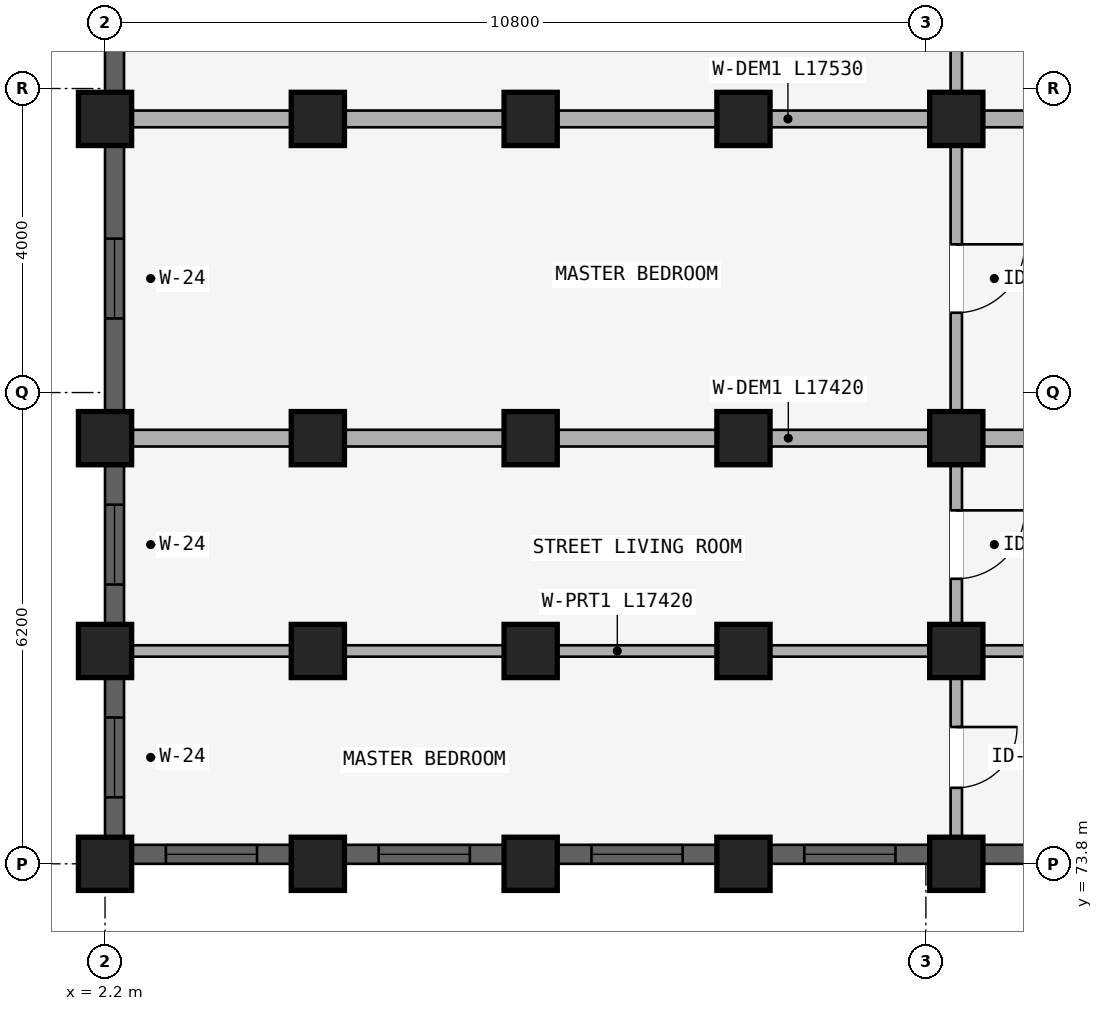
"""IFC4 building model, lengths in metres.
Left out: names, types, materials, properties, quantities, classifications, styles, units other than length and angle.
Written with IfcOpenShell. Run it as: python <this file> out.ifc"""

import sys

from ifc_helpers import new_model, si_unit, direction, frame, frame_2d, origin, origin_2d, place, context, subcontext, project, spatial, rectangle, extrude, element, fill, save


model = new_model("IFC4")
c1 = context("Model", 3, precision=1e-05, world=origin(), true_north=direction((0.0, 1.0)))
c2 = subcontext(c1, "Body", "Model", "MODEL_VIEW")
j1 = project(units=[si_unit("LENGTHUNIT", "METRE"), si_unit("PLANEANGLEUNIT", "RADIAN")], contexts=[c1])
p1 = place(None, origin())
s1 = spatial("IfcSite", under=j1, at=p1, CompositionType="ELEMENT")
p2 = place(p1, origin())
s2 = spatial("IfcBuilding", under=s1, at=p2, CompositionType="ELEMENT")
p3 = place(p2, frame((0.0, 0.0, 21.3)))
s3 = spatial("IfcBuildingStorey", under=s2, at=p3, CompositionType="ELEMENT", Elevation=21.3)
for number, where, z_axis, x_axis in (
    (1, (13.4, 83.6, 0.0), (0.0, 0.0, 1.0), (1.0, 0.0, 0.0)),
    (2, (10.6, 83.6, 0.0), (0.0, 0.0, 1.0), (1.0, 0.0, 0.0)),
    (3, (7.8, 83.6, 0.0), (0.0, 0.0, 1.0), (1.0, 0.0, 0.0)),
    (4, (5.0, 83.6, 0.0), (0.0, 0.0, 1.0), (1.0, 0.0, 0.0)),
    (5, (2.2, 83.6, 0.0), (0.0, 0.0, 1.0), (1.0, 0.0, 0.0)),
    (6, (13.4, 79.4, 0.0), (0.0, 0.0, 1.0), (1.0, 0.0, 0.0)),
    (7, (10.6, 79.4, 0.0), (0.0, 0.0, 1.0), (1.0, 0.0, 0.0)),
    (8, (7.8, 79.4, 0.0), (0.0, 0.0, 1.0), (1.0, 0.0, 0.0)),
    (9, (5.0, 79.4, 0.0), (0.0, 0.0, 1.0), (1.0, 0.0, 0.0)),
    (10, (2.2, 79.4, 0.0), (0.0, 0.0, 1.0), (1.0, 0.0, 0.0)),
    (11, (13.4, 76.6, 0.0), (0.0, 0.0, 1.0), (1.0, 0.0, 0.0)),
    (12, (10.6, 76.6, 0.0), (0.0, 0.0, 1.0), (1.0, 0.0, 0.0)),
    (13, (7.8, 76.6, 0.0), (0.0, 0.0, 1.0), (1.0, 0.0, 0.0)),
    (14, (5.0, 76.6, 0.0), (0.0, 0.0, 1.0), (1.0, 0.0, 0.0)),
    (15, (2.2, 76.6, 0.0), (0.0, 0.0, 1.0), (1.0, 0.0, 0.0)),
    (16, (13.4, 73.8, 0.0), (0.0, 0.0, 1.0), (1.0, 0.0, 0.0)),
    (17, (10.6, 73.8, 0.0), (0.0, 0.0, 1.0), (1.0, 0.0, 0.0)),
    (18, (7.8, 73.8, 0.0), (0.0, 0.0, 1.0), (1.0, 0.0, 0.0)),
    (19, (5.0, 73.8, 0.0), (0.0, 0.0, 1.0), (1.0, 0.0, 0.0)),
    (20, (2.2, 73.8, 0.0), (0.0, 0.0, 1.0), (1.0, 0.0, 0.0)),
):
    element("IfcColumn", number, at=place(p3, frame(where, z_axis=z_axis, x_axis=x_axis)), inside=s3, PredefinedType="COLUMN", context=c2, shape_type="SweptSolid", body=[
        extrude(rectangle(XDim=0.7, YDim=0.7, at=origin_2d()), origin(), (0.0, 0.0, 1.0), 2.93),
    ])
p4 = place(p3, frame((13.4, 87.57, 0.0), z_axis=(0.0, 0.0, 1.0), x_axis=(0.0, -1.0, 0.0)))
e21 = element("IfcWall", 21, at=p4, inside=s3, PredefinedType="PARTITIONING", context=c2, shape_type="SweptSolid", body=[
    extrude(rectangle(XDim=3.89, YDim=0.15, at=frame_2d((1.945, 0.0))), origin(), (0.0, 0.0, 1.0), 2.372),
])
p5 = place(p4, frame((1.495, 0.0, 0.0)))
e22 = element("IfcOpeningElement", 22, at=p5, cuts=e21, PredefinedType="OPENING", context=c2, shape_type="SweptSolid", body=[
    extrude(rectangle(XDim=0.9, YDim=2.1, at=frame_2d((0.45, 1.05))), frame((0.0, 0.085, 0.0), z_axis=(0.0, -1.0, 0.0), x_axis=(1.0, 0.0, 0.0)), (0.0, 0.0, 1.0), 0.17),
])
p6 = place(p3, frame((13.4, 83.52, 0.0), z_axis=(0.0, 0.0, 1.0), x_axis=(0.0, -1.0, 0.0)))
e23 = element("IfcWall", 23, at=p6, inside=s3, PredefinedType="PARTITIONING", context=c2, shape_type="SweptSolid", body=[
    extrude(rectangle(XDim=4.04, YDim=0.15, at=frame_2d((2.02, 0.0))), origin(), (0.0, 0.0, 1.0), 2.372),
])
p7 = place(p6, frame((1.57, 0.0, 0.0)))
e24 = element("IfcOpeningElement", 24, at=p7, cuts=e23, PredefinedType="OPENING", context=c2, shape_type="SweptSolid", body=[
    extrude(rectangle(XDim=0.9, YDim=2.1, at=frame_2d((0.45, 1.05))), frame((0.0, 0.085, 0.0), z_axis=(0.0, -1.0, 0.0), x_axis=(1.0, 0.0, 0.0)), (0.0, 0.0, 1.0), 0.17),
])
p8 = place(p3, frame((19.95, 83.6, 0.0), z_axis=(0.0, 0.0, 1.0), x_axis=(-1.0, 0.0, 0.0)))
e25 = element("IfcWall", 25, at=p8, inside=s3, PredefinedType="STANDARD", context=c2, shape_type="SweptSolid", body=[
    extrude(rectangle(XDim=17.53, YDim=0.22, at=frame_2d((8.765, 0.0))), origin(), (0.0, 0.0, 1.0), 2.372),
])
p9 = place(p3, frame((13.4, 79.32, 0.0), z_axis=(0.0, 0.0, 1.0), x_axis=(0.0, -1.0, 0.0)))
e26 = element("IfcWall", 26, at=p9, inside=s3, PredefinedType="PLUMBINGWALL", context=c2, shape_type="SweptSolid", body=[
    extrude(rectangle(XDim=2.64, YDim=0.15, at=frame_2d((1.32, 0.0))), origin(), (0.0, 0.0, 1.0), 2.372),
])
p10 = place(p9, frame((0.87, 0.0, 0.0)))
e27 = element("IfcOpeningElement", 27, at=p10, cuts=e26, PredefinedType="OPENING", context=c2, shape_type="SweptSolid", body=[
    extrude(rectangle(XDim=0.9, YDim=2.1, at=frame_2d((0.45, 1.05))), frame((0.0, 0.085, 0.0), z_axis=(0.0, -1.0, 0.0), x_axis=(1.0, 0.0, 0.0)), (0.0, 0.0, 1.0), 0.17),
])
p11 = place(p3, frame((19.9, 79.4, 0.0), z_axis=(0.0, 0.0, 1.0), x_axis=(-1.0, 0.0, 0.0)))
e28 = element("IfcWall", 28, at=p11, inside=s3, PredefinedType="STANDARD", context=c2, shape_type="SweptSolid", body=[
    extrude(rectangle(XDim=17.42, YDim=0.22, at=frame_2d((8.71, 0.0))), origin(), (0.0, 0.0, 1.0), 2.372),
])
p12 = place(p3, frame((13.4, 76.52, 0.0), z_axis=(0.0, 0.0, 1.0), x_axis=(0.0, -1.0, 0.0)))
e29 = element("IfcWall", 29, at=p12, inside=s3, PredefinedType="PLUMBINGWALL", context=c2, shape_type="SweptSolid", body=[
    extrude(rectangle(XDim=2.64, YDim=0.15, at=frame_2d((1.32, 0.0))), origin(), (0.0, 0.0, 1.0), 2.372),
])
p13 = place(p12, frame((0.92, 0.0, 0.0)))
e30 = element("IfcOpeningElement", 30, at=p13, cuts=e29, PredefinedType="OPENING", context=c2, shape_type="SweptSolid", body=[
    extrude(rectangle(XDim=0.8, YDim=2.1, at=frame_2d((0.4, 1.05))), frame((0.0, 0.085, 0.0), z_axis=(0.0, -1.0, 0.0), x_axis=(1.0, 0.0, 0.0)), (0.0, 0.0, 1.0), 0.17),
])
p14 = place(p3, frame((19.9, 76.6, 0.0), z_axis=(0.0, 0.0, 1.0), x_axis=(-1.0, 0.0, 0.0)))
e31 = element("IfcWall", 31, at=p14, inside=s3, PredefinedType="PARTITIONING", context=c2, shape_type="SweptSolid", body=[
    extrude(rectangle(XDim=17.42, YDim=0.15, at=frame_2d((8.71, 0.0))), origin(), (0.0, 0.0, 1.0), 2.372),
])
p15 = place(p14, frame((2.75, 0.0, 0.0)))
e32 = element("IfcOpeningElement", 32, at=p15, cuts=e31, PredefinedType="OPENING", context=c2, shape_type="SweptSolid", body=[
    extrude(rectangle(XDim=0.9, YDim=2.1, at=frame_2d((0.45, 1.05))), frame((0.0, 0.085, 0.0), z_axis=(0.0, -1.0, 0.0), x_axis=(1.0, 0.0, 0.0)), (0.0, 0.0, 1.0), 0.17),
])
p16 = place(p3, frame((2.325, 87.447, 0.0), z_axis=(0.0, 0.0, 1.0), x_axis=(0.0, -1.0, 0.0)))
e33 = element("IfcWall", 33, at=p16, inside=s3, PredefinedType="STANDARD", context=c2, shape_type="SweptSolid", body=[
    extrude(rectangle(XDim=3.493, YDim=0.25, at=frame_2d((1.747, 0.0))), origin(), (0.0, 0.0, 1.0), 2.472),
])
p17 = place(p16, frame((1.221, 0.0, 0.88)))
e34 = element("IfcOpeningElement", 34, at=p17, cuts=e33, PredefinedType="OPENING", context=c2, shape_type="SweptSolid", body=[
    extrude(rectangle(XDim=1.05, YDim=1.25, at=frame_2d((0.525, 0.625))), frame((0.0, 0.135, 0.0), z_axis=(0.0, -1.0, 0.0), x_axis=(1.0, 0.0, 0.0)), (0.0, 0.0, 1.0), 0.27),
])
p18 = place(p3, frame((2.325, 83.247, 0.0), z_axis=(0.0, 0.0, 1.0), x_axis=(0.0, -1.0, 0.0)))
e35 = element("IfcWall", 35, at=p18, inside=s3, PredefinedType="STANDARD", context=c2, shape_type="SweptSolid", body=[
    extrude(rectangle(XDim=3.493, YDim=0.25, at=frame_2d((1.747, 0.0))), origin(), (0.0, 0.0, 1.0), 2.472),
])
p19 = place(p18, frame((1.221, 0.0, 0.88)))
e36 = element("IfcOpeningElement", 36, at=p19, cuts=e35, PredefinedType="OPENING", context=c2, shape_type="SweptSolid", body=[
    extrude(rectangle(XDim=1.05, YDim=1.25, at=frame_2d((0.525, 0.625))), frame((0.0, 0.135, 0.0), z_axis=(0.0, -1.0, 0.0), x_axis=(1.0, 0.0, 0.0)), (0.0, 0.0, 1.0), 0.27),
])
p20 = place(p3, frame((2.325, 79.046, 0.0), z_axis=(0.0, 0.0, 1.0), x_axis=(0.0, -1.0, 0.0)))
e37 = element("IfcWall", 37, at=p20, inside=s3, PredefinedType="STANDARD", context=c2, shape_type="SweptSolid", body=[
    extrude(rectangle(XDim=2.093, YDim=0.25, at=frame_2d((1.046, 0.0))), origin(), (0.0, 0.0, 1.0), 2.472),
])
p21 = place(p20, frame((0.521, 0.0, 0.88)))
e38 = element("IfcOpeningElement", 38, at=p21, cuts=e37, PredefinedType="OPENING", context=c2, shape_type="SweptSolid", body=[
    extrude(rectangle(XDim=1.05, YDim=1.25, at=frame_2d((0.525, 0.625))), frame((0.0, 0.135, 0.0), z_axis=(0.0, -1.0, 0.0), x_axis=(1.0, 0.0, 0.0)), (0.0, 0.0, 1.0), 0.27),
])
p22 = place(p3, frame((2.325, 76.247, 0.0), z_axis=(0.0, 0.0, 1.0), x_axis=(0.0, -1.0, 0.0)))
e39 = element("IfcWall", 39, at=p22, inside=s3, PredefinedType="STANDARD", context=c2, shape_type="SweptSolid", body=[
    extrude(rectangle(XDim=2.093, YDim=0.25, at=frame_2d((1.046, 0.0))), origin(), (0.0, 0.0, 1.0), 2.472),
])
p23 = place(p22, frame((0.521, 0.0, 0.88)))
e40 = element("IfcOpeningElement", 40, at=p23, cuts=e39, PredefinedType="OPENING", context=c2, shape_type="SweptSolid", body=[
    extrude(rectangle(XDim=1.05, YDim=1.25, at=frame_2d((0.525, 0.625))), frame((0.0, 0.135, 0.0), z_axis=(0.0, -1.0, 0.0), x_axis=(1.0, 0.0, 0.0)), (0.0, 0.0, 1.0), 0.27),
])
p24 = place(p3, frame((19.771, 73.925, 0.0), z_axis=(0.0, 0.0, 1.0), x_axis=(-1.0, 0.0, 0.0)))
e41 = element("IfcWall", 41, at=p24, inside=s3, PredefinedType="STANDARD", context=c2, shape_type="SweptSolid", body=[
    extrude(rectangle(XDim=6.018, YDim=0.25, at=frame_2d((3.009, 0.0))), origin(), (0.0, 0.0, 1.0), 2.372),
])
p25 = place(p24, frame((2.322, 0.0, 0.522)))
e42 = element("IfcOpeningElement", 42, at=p25, cuts=e41, PredefinedType="OPENING", context=c2, shape_type="SweptSolid", body=[
    extrude(rectangle(XDim=1.5, YDim=1.65, at=frame_2d((0.75, 0.825))), frame((0.0, 0.135, 0.0), z_axis=(0.0, -1.0, 0.0), x_axis=(1.0, 0.0, 0.0)), (0.0, 0.0, 1.0), 0.27),
])
p26 = place(p3, frame((13.046, 73.925, 0.0), z_axis=(0.0, 0.0, 1.0), x_axis=(-1.0, 0.0, 0.0)))
e43 = element("IfcWall", 43, at=p26, inside=s3, PredefinedType="STANDARD", context=c2, shape_type="SweptSolid", body=[
    extrude(rectangle(XDim=2.093, YDim=0.25, at=frame_2d((1.046, 0.0))), origin(), (0.0, 0.0, 1.0), 2.372),
])
p27 = place(p26, frame((0.447, 0.0, 0.672)))
e44 = element("IfcOpeningElement", 44, at=p27, cuts=e43, PredefinedType="OPENING", context=c2, shape_type="SweptSolid", body=[
    extrude(rectangle(XDim=1.2, YDim=1.5, at=frame_2d((0.6, 0.75))), frame((0.0, 0.135, 0.0), z_axis=(0.0, -1.0, 0.0), x_axis=(1.0, 0.0, 0.0)), (0.0, 0.0, 1.0), 0.27),
])
p28 = place(p3, frame((10.247, 73.925, 0.0), z_axis=(0.0, 0.0, 1.0), x_axis=(-1.0, 0.0, 0.0)))
e45 = element("IfcWall", 45, at=p28, inside=s3, PredefinedType="STANDARD", context=c2, shape_type="SweptSolid", body=[
    extrude(rectangle(XDim=2.093, YDim=0.25, at=frame_2d((1.046, 0.0))), origin(), (0.0, 0.0, 1.0), 2.372),
])
p29 = place(p28, frame((0.447, 0.0, 0.672)))
e46 = element("IfcOpeningElement", 46, at=p29, cuts=e45, PredefinedType="OPENING", context=c2, shape_type="SweptSolid", body=[
    extrude(rectangle(XDim=1.2, YDim=1.5, at=frame_2d((0.6, 0.75))), frame((0.0, 0.135, 0.0), z_axis=(0.0, -1.0, 0.0), x_axis=(1.0, 0.0, 0.0)), (0.0, 0.0, 1.0), 0.27),
])
p30 = place(p3, frame((7.447, 73.925, 0.0), z_axis=(0.0, 0.0, 1.0), x_axis=(-1.0, 0.0, 0.0)))
e47 = element("IfcWall", 47, at=p30, inside=s3, PredefinedType="STANDARD", context=c2, shape_type="SweptSolid", body=[
    extrude(rectangle(XDim=2.093, YDim=0.25, at=frame_2d((1.046, 0.0))), origin(), (0.0, 0.0, 1.0), 2.372),
])
p31 = place(p30, frame((0.447, 0.0, 0.672)))
e48 = element("IfcOpeningElement", 48, at=p31, cuts=e47, PredefinedType="OPENING", context=c2, shape_type="SweptSolid", body=[
    extrude(rectangle(XDim=1.2, YDim=1.5, at=frame_2d((0.6, 0.75))), frame((0.0, 0.135, 0.0), z_axis=(0.0, -1.0, 0.0), x_axis=(1.0, 0.0, 0.0)), (0.0, 0.0, 1.0), 0.27),
])
p32 = place(p3, frame((4.646, 73.925, 0.0), z_axis=(0.0, 0.0, 1.0), x_axis=(-1.0, 0.0, 0.0)))
e49 = element("IfcWall", 49, at=p32, inside=s3, PredefinedType="STANDARD", context=c2, shape_type="SweptSolid", body=[
    extrude(rectangle(XDim=2.093, YDim=0.25, at=frame_2d((1.046, 0.0))), origin(), (0.0, 0.0, 1.0), 2.372),
])
p33 = place(p32, frame((0.447, 0.0, 0.672)))
e50 = element("IfcOpeningElement", 50, at=p33, cuts=e49, PredefinedType="OPENING", context=c2, shape_type="SweptSolid", body=[
    extrude(rectangle(XDim=1.2, YDim=1.5, at=frame_2d((0.6, 0.75))), frame((0.0, 0.135, 0.0), z_axis=(0.0, -1.0, 0.0), x_axis=(1.0, 0.0, 0.0)), (0.0, 0.0, 1.0), 0.27),
])
p34 = place(p19, origin())
e51 = element("IfcWindow", 51, at=p34, inside=s3, PartitioningType="SINGLE_PANEL", PredefinedType="WINDOW", context=c2, shape_type="SweptSolid", body=[
    extrude(rectangle(XDim=1.05, YDim=1.25, at=frame_2d((0.525, 0.625))), frame((0.0, 0.03, 0.0), z_axis=(0.0, -1.0, 0.0), x_axis=(1.0, 0.0, 0.0)), (0.0, 0.0, 1.0), 0.06),
])
fill(e36, e51)
p35 = place(p21, origin())
e52 = element("IfcWindow", 52, at=p35, inside=s3, PartitioningType="SINGLE_PANEL", PredefinedType="WINDOW", context=c2, shape_type="SweptSolid", body=[
    extrude(rectangle(XDim=1.05, YDim=1.25, at=frame_2d((0.525, 0.625))), frame((0.0, 0.03, 0.0), z_axis=(0.0, -1.0, 0.0), x_axis=(1.0, 0.0, 0.0)), (0.0, 0.0, 1.0), 0.06),
])
fill(e38, e52)
p36 = place(p23, origin())
e53 = element("IfcWindow", 53, at=p36, inside=s3, PartitioningType="SINGLE_PANEL", PredefinedType="WINDOW", context=c2, shape_type="SweptSolid", body=[
    extrude(rectangle(XDim=1.05, YDim=1.25, at=frame_2d((0.525, 0.625))), frame((0.0, 0.03, 0.0), z_axis=(0.0, -1.0, 0.0), x_axis=(1.0, 0.0, 0.0)), (0.0, 0.0, 1.0), 0.06),
])
fill(e40, e53)
p37 = place(p27, origin())
e54 = element("IfcWindow", 54, at=p37, inside=s3, PartitioningType="SINGLE_PANEL", PredefinedType="WINDOW", context=c2, shape_type="SweptSolid", body=[
    extrude(rectangle(XDim=1.2, YDim=1.5, at=frame_2d((0.6, 0.75))), frame((0.0, 0.03, 0.0), z_axis=(0.0, -1.0, 0.0), x_axis=(1.0, 0.0, 0.0)), (0.0, 0.0, 1.0), 0.06),
])
fill(e44, e54)
p38 = place(p29, origin())
e55 = element("IfcWindow", 55, at=p38, inside=s3, PartitioningType="SINGLE_PANEL", PredefinedType="WINDOW", context=c2, shape_type="SweptSolid", body=[
    extrude(rectangle(XDim=1.2, YDim=1.5, at=frame_2d((0.6, 0.75))), frame((0.0, 0.03, 0.0), z_axis=(0.0, -1.0, 0.0), x_axis=(1.0, 0.0, 0.0)), (0.0, 0.0, 1.0), 0.06),
])
fill(e46, e55)
p39 = place(p31, origin())
e56 = element("IfcWindow", 56, at=p39, inside=s3, PartitioningType="SINGLE_PANEL", PredefinedType="WINDOW", context=c2, shape_type="SweptSolid", body=[
    extrude(rectangle(XDim=1.2, YDim=1.5, at=frame_2d((0.6, 0.75))), frame((0.0, 0.03, 0.0), z_axis=(0.0, -1.0, 0.0), x_axis=(1.0, 0.0, 0.0)), (0.0, 0.0, 1.0), 0.06),
])
fill(e48, e56)
p40 = place(p33, origin())
e57 = element("IfcWindow", 57, at=p40, inside=s3, PartitioningType="SINGLE_PANEL", PredefinedType="WINDOW", context=c2, shape_type="SweptSolid", body=[
    extrude(rectangle(XDim=1.2, YDim=1.5, at=frame_2d((0.6, 0.75))), frame((0.0, 0.03, 0.0), z_axis=(0.0, -1.0, 0.0), x_axis=(1.0, 0.0, 0.0)), (0.0, 0.0, 1.0), 0.06),
])
fill(e50, e57)
p41 = place(p7, frame((0.9, 0.0, 0.0), z_axis=(0.0, 0.0, 1.0), x_axis=(-1.0, 0.0, 0.0)))
e58 = element("IfcDoor", 58, at=p41, inside=s3, OperationType="SINGLE_SWING_RIGHT", PredefinedType="DOOR", context=c2, shape_type="SweptSolid", body=[
    extrude(rectangle(XDim=0.9, YDim=2.1, at=frame_2d((0.45, 1.05))), frame((0.0, 0.025, 0.0), z_axis=(0.0, -1.0, 0.0), x_axis=(1.0, 0.0, 0.0)), (0.0, 0.0, 1.0), 0.05),
])
fill(e24, e58)
p42 = place(p10, frame((0.9, 0.0, 0.0), z_axis=(0.0, 0.0, 1.0), x_axis=(-1.0, 0.0, 0.0)))
e59 = element("IfcDoor", 59, at=p42, inside=s3, OperationType="SINGLE_SWING_RIGHT", PredefinedType="DOOR", context=c2, shape_type="SweptSolid", body=[
    extrude(rectangle(XDim=0.9, YDim=2.1, at=frame_2d((0.45, 1.05))), frame((0.0, 0.025, 0.0), z_axis=(0.0, -1.0, 0.0), x_axis=(1.0, 0.0, 0.0)), (0.0, 0.0, 1.0), 0.05),
])
fill(e27, e59)
p43 = place(p13, frame((0.8, 0.0, 0.0), z_axis=(0.0, 0.0, 1.0), x_axis=(-1.0, 0.0, 0.0)))
e60 = element("IfcDoor", 60, at=p43, inside=s3, OperationType="SINGLE_SWING_RIGHT", PredefinedType="DOOR", context=c2, shape_type="SweptSolid", body=[
    extrude(rectangle(XDim=0.8, YDim=2.1, at=frame_2d((0.4, 1.05))), frame((0.0, 0.025, 0.0), z_axis=(0.0, -1.0, 0.0), x_axis=(1.0, 0.0, 0.0)), (0.0, 0.0, 1.0), 0.05),
])
fill(e30, e60)
save(model, sys.argv[1])
